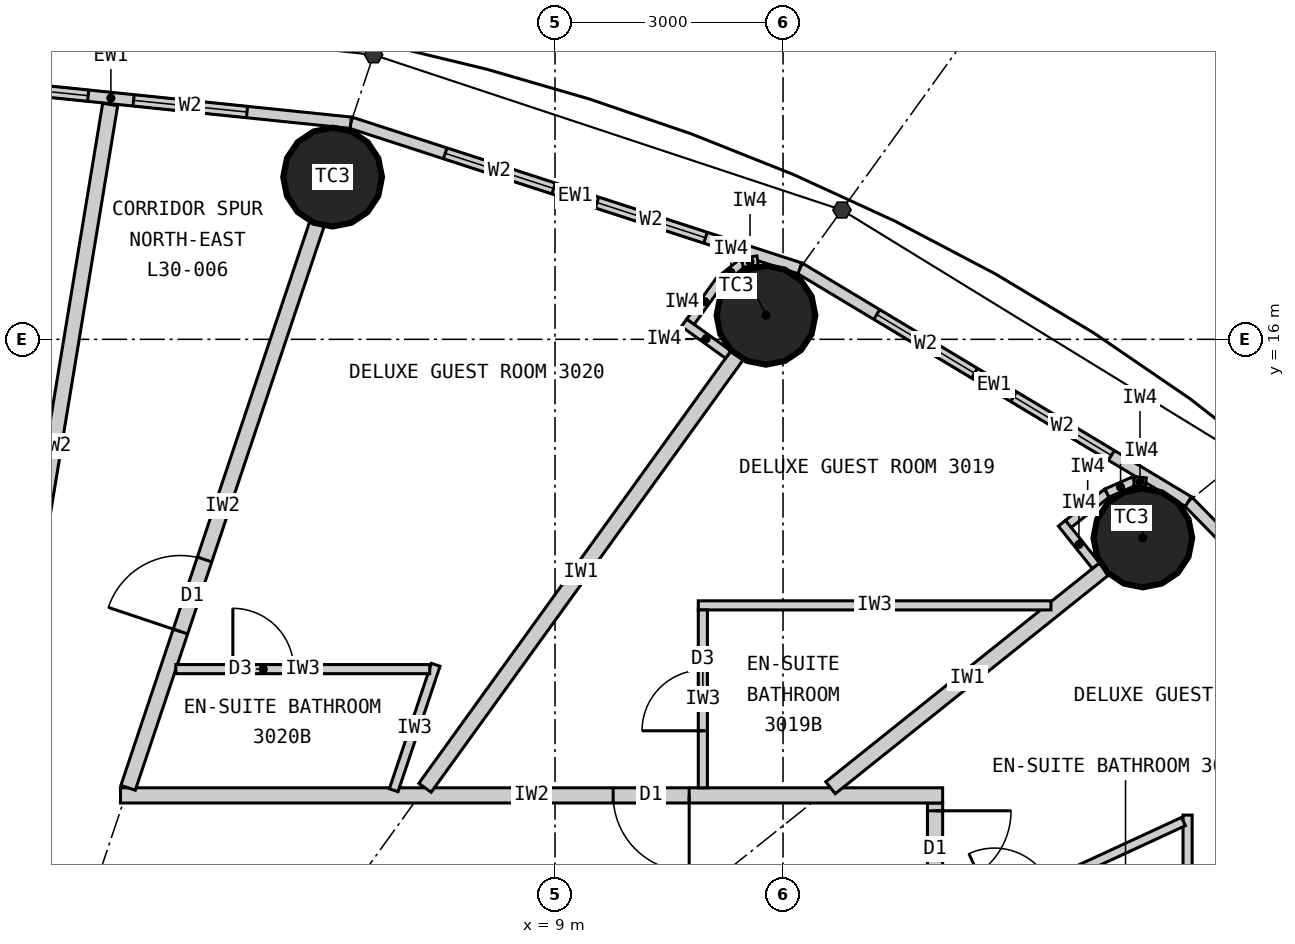
"""IFC4 building model, lengths in metres.
Left out: names, types, materials, properties, quantities, classifications, styles, units other than length and angle.
Written with IfcOpenShell. Run it as: python <this file> out.ifc"""

import sys

from ifc_helpers import new_model, si_unit, direction, frame, frame_2d, origin, origin_2d, place, context, subcontext, project, spatial, rectangle, circle, extrude, element, fill, save


model = new_model("IFC4")
c1 = context("Model", 3, precision=1e-05, world=origin(), true_north=direction((0.0, 1.0)))
c2 = subcontext(c1, "Body", "Model", "MODEL_VIEW")
j1 = project(units=[si_unit("LENGTHUNIT", "METRE"), si_unit("PLANEANGLEUNIT", "RADIAN")], contexts=[c1])
p1 = place(None, origin())
s1 = spatial("IfcSite", under=j1, at=p1, CompositionType="ELEMENT")
p2 = place(p1, origin())
s2 = spatial("IfcBuilding", under=s1, at=p2, CompositionType="ELEMENT")
p3 = place(p2, frame((0.0, 0.0, 118.8)))
s3 = spatial("IfcBuildingStorey", under=s2, at=p3, CompositionType="ELEMENT", Elevation=118.8)
for number, where, z_axis, x_axis in (
    (1, (16.734, 13.387, 0.0), (0.0, 0.0, 1.0), (1.0, 0.0, 0.0)),
    (2, (11.775, 16.316, 0.0), (0.0, 0.0, 1.0), (1.0, 0.0, 0.0)),
    (3, (6.074, 18.135, 0.0), (0.0, 0.0, 1.0), (1.0, 0.0, 0.0)),
):
    element("IfcColumn", number, at=place(p3, frame(where, z_axis=z_axis, x_axis=x_axis)), inside=s3, PredefinedType="COLUMN", context=c2, shape_type="SweptSolid", body=[
        extrude(circle(Radius=0.65, at=origin_2d()), origin(), (0.0, 0.0, 1.0), 3.3),
    ])
p4 = place(p3, frame((21.287, 9.832, 0.0), z_axis=(0.0, 0.0, 1.0), x_axis=(-0.700136650834, 0.714008872605, 0.0)))
e4 = element("IfcWall", 4, at=p4, inside=s3, PredefinedType="ELEMENTEDWALL", context=c2, shape_type="SweptSolid", body=[
    extrude(rectangle(XDim=5.649, YDim=0.15, at=frame_2d((2.825, 0.0))), origin(), (0.0, 0.0, 1.0), 3.12),
])
p5 = place(p4, frame((1.025, 0.0, 0.9)))
e5 = element("IfcOpeningElement", 5, at=p5, cuts=e4, PredefinedType="OPENING", context=c2, shape_type="SweptSolid", body=[
    extrude(rectangle(XDim=1.5, YDim=1.9, at=frame_2d((0.75, 0.95))), frame((0.0, 0.085, 0.0), z_axis=(0.0, -1.0, 0.0), x_axis=(1.0, 0.0, 0.0)), (0.0, 0.0, 1.0), 0.17),
])
p6 = place(p4, frame((3.125, 0.0, 0.9)))
e6 = element("IfcOpeningElement", 6, at=p6, cuts=e4, PredefinedType="OPENING", context=c2, shape_type="SweptSolid", body=[
    extrude(rectangle(XDim=1.5, YDim=1.9, at=frame_2d((0.75, 0.95))), frame((0.0, 0.085, 0.0), z_axis=(0.0, -1.0, 0.0), x_axis=(1.0, 0.0, 0.0)), (0.0, 0.0, 1.0), 0.17),
])
p7 = place(p3, frame((17.332, 13.866, 0.0), z_axis=(0.0, 0.0, 1.0), x_axis=(-0.857308573723, 0.514802884044, 0.0)))
e7 = element("IfcWall", 7, at=p7, inside=s3, PredefinedType="ELEMENTEDWALL", context=c2, shape_type="SweptSolid", body=[
    extrude(rectangle(XDim=5.961, YDim=0.15, at=frame_2d((2.98, 0.0))), origin(), (0.0, 0.0, 1.0), 3.12),
])
p8 = place(p7, frame((1.181, 0.0, 0.9)))
e8 = element("IfcOpeningElement", 8, at=p8, cuts=e7, PredefinedType="OPENING", context=c2, shape_type="SweptSolid", body=[
    extrude(rectangle(XDim=1.5, YDim=1.9, at=frame_2d((0.75, 0.95))), frame((0.0, 0.085, 0.0), z_axis=(0.0, -1.0, 0.0), x_axis=(1.0, 0.0, 0.0)), (0.0, 0.0, 1.0), 0.17),
])
p9 = place(p7, frame((3.281, 0.0, 0.9)))
e9 = element("IfcOpeningElement", 9, at=p9, cuts=e7, PredefinedType="OPENING", context=c2, shape_type="SweptSolid", body=[
    extrude(rectangle(XDim=1.5, YDim=1.9, at=frame_2d((0.75, 0.95))), frame((0.0, 0.085, 0.0), z_axis=(0.0, -1.0, 0.0), x_axis=(1.0, 0.0, 0.0)), (0.0, 0.0, 1.0), 0.17),
])
p10 = place(p3, frame((12.221, 16.935, 0.0), z_axis=(0.0, 0.0, 1.0), x_axis=(-0.951272691506, 0.308350881944, 0.0)))
e10 = element("IfcWall", 10, at=p10, inside=s3, PredefinedType="ELEMENTEDWALL", context=c2, shape_type="SweptSolid", body=[
    extrude(rectangle(XDim=6.211, YDim=0.15, at=frame_2d((3.105, 0.0))), origin(), (0.0, 0.0, 1.0), 3.12),
])
p11 = place(p10, frame((1.305, 0.0, 0.9)))
e11 = element("IfcOpeningElement", 11, at=p11, cuts=e10, PredefinedType="OPENING", context=c2, shape_type="SweptSolid", body=[
    extrude(rectangle(XDim=1.5, YDim=1.9, at=frame_2d((0.75, 0.95))), frame((0.0, 0.085, 0.0), z_axis=(0.0, -1.0, 0.0), x_axis=(1.0, 0.0, 0.0)), (0.0, 0.0, 1.0), 0.17),
])
p12 = place(p10, frame((3.405, 0.0, 0.9)))
e12 = element("IfcOpeningElement", 12, at=p12, cuts=e10, PredefinedType="OPENING", context=c2, shape_type="SweptSolid", body=[
    extrude(rectangle(XDim=1.5, YDim=1.9, at=frame_2d((0.75, 0.95))), frame((0.0, 0.085, 0.0), z_axis=(0.0, -1.0, 0.0), x_axis=(1.0, 0.0, 0.0)), (0.0, 0.0, 1.0), 0.17),
])
p13 = place(p3, frame((6.313, 18.85, 0.0), z_axis=(0.0, 0.0, 1.0), x_axis=(-0.994735690163, 0.102473931887, 0.0)))
e13 = element("IfcWall", 13, at=p13, inside=s3, PredefinedType="ELEMENTEDWALL", context=c2, shape_type="SweptSolid", body=[
    extrude(rectangle(XDim=6.347, YDim=0.15, at=frame_2d((3.173, 0.0))), origin(), (0.0, 0.0, 1.0), 3.12),
])
p14 = place(p13, frame((1.373, 0.0, 0.9)))
e14 = element("IfcOpeningElement", 14, at=p14, cuts=e13, PredefinedType="OPENING", context=c2, shape_type="SweptSolid", body=[
    extrude(rectangle(XDim=1.5, YDim=1.9, at=frame_2d((0.75, 0.95))), frame((0.0, 0.085, 0.0), z_axis=(0.0, -1.0, 0.0), x_axis=(1.0, 0.0, 0.0)), (0.0, 0.0, 1.0), 0.17),
])
p15 = place(p13, frame((3.473, 0.0, 0.9)))
e15 = element("IfcOpeningElement", 15, at=p15, cuts=e13, PredefinedType="OPENING", context=c2, shape_type="SweptSolid", body=[
    extrude(rectangle(XDim=1.5, YDim=1.9, at=frame_2d((0.75, 0.95))), frame((0.0, 0.085, 0.0), z_axis=(0.0, -1.0, 0.0), x_axis=(1.0, 0.0, 0.0)), (0.0, 0.0, 1.0), 0.17),
])
p16 = place(p3, frame((14.0, -9.9, 0.0), z_axis=(0.0, 0.0, 1.0), x_axis=(0.0, 1.0, 0.0)))
e16 = element("IfcWall", 16, at=p16, inside=s3, PredefinedType="PARTITIONING", context=c2, shape_type="SweptSolid", body=[
    extrude(rectangle(XDim=19.8, YDim=0.2, at=frame_2d((9.9, 0.0))), origin(), (0.0, 0.0, 1.0), 3.12),
])
p17 = place(p16, frame((2.478, 0.0, 0.0)))
e17 = element("IfcOpeningElement", 17, at=p17, cuts=e16, PredefinedType="OPENING", context=c2, shape_type="SweptSolid", body=[
    extrude(rectangle(XDim=1.0, YDim=2.2, at=frame_2d((0.5, 1.1))), frame((0.0, 0.11, 0.0), z_axis=(0.0, -1.0, 0.0), x_axis=(1.0, 0.0, 0.0)), (0.0, 0.0, 1.0), 0.22),
])
p18 = place(p16, frame((8.838, 0.0, 0.0)))
e18 = element("IfcOpeningElement", 18, at=p18, cuts=e16, PredefinedType="OPENING", context=c2, shape_type="SweptSolid", body=[
    extrude(rectangle(XDim=1.0, YDim=2.2, at=frame_2d((0.5, 1.1))), frame((0.0, 0.11, 0.0), z_axis=(0.0, -1.0, 0.0), x_axis=(1.0, 0.0, 0.0)), (0.0, 0.0, 1.0), 0.22),
])
p19 = place(p16, frame((13.742, 0.0, 0.0)))
e19 = element("IfcOpeningElement", 19, at=p19, cuts=e16, PredefinedType="OPENING", context=c2, shape_type="SweptSolid", body=[
    extrude(rectangle(XDim=1.0, YDim=2.2, at=frame_2d((0.5, 1.1))), frame((0.0, 0.11, 0.0), z_axis=(0.0, -1.0, 0.0), x_axis=(1.0, 0.0, 0.0)), (0.0, 0.0, 1.0), 0.22),
])
p20 = place(p16, frame((18.698, 0.0, 0.0)))
e20 = element("IfcOpeningElement", 20, at=p20, cuts=e16, PredefinedType="OPENING", context=c2, shape_type="SweptSolid", body=[
    extrude(rectangle(XDim=1.0, YDim=2.2, at=frame_2d((0.5, 1.1))), frame((0.0, 0.11, 0.0), z_axis=(0.0, -1.0, 0.0), x_axis=(1.0, 0.0, 0.0)), (0.0, 0.0, 1.0), 0.22),
])
p21 = place(p3, frame((3.283, 10.0, 0.0), z_axis=(0.0, 0.0, 1.0), x_axis=(1.0, 0.0, 0.0)))
e21 = element("IfcWall", 21, at=p21, inside=s3, PredefinedType="PARTITIONING", context=c2, shape_type="SweptSolid", body=[
    extrude(rectangle(XDim=10.817, YDim=0.2, at=frame_2d((5.409, 0.0))), origin(), (0.0, 0.0, 1.0), 3.12),
])
p22 = place(p21, frame((6.482, 0.0, 0.0)))
e22 = element("IfcOpeningElement", 22, at=p22, cuts=e21, PredefinedType="OPENING", context=c2, shape_type="SweptSolid", body=[
    extrude(rectangle(XDim=1.0, YDim=2.2, at=frame_2d((0.5, 1.1))), frame((0.0, 0.11, 0.0), z_axis=(0.0, -1.0, 0.0), x_axis=(1.0, 0.0, 0.0)), (0.0, 0.0, 1.0), 0.22),
])
p23 = place(p3, frame((14.1, 6.512, 0.0), z_axis=(0.0, 0.0, 1.0), x_axis=(0.907833019998, 0.419331858797, 0.0)))
e23 = element("IfcWall", 23, at=p23, inside=s3, PredefinedType="PARTITIONING", context=c2, shape_type="SweptSolid", body=[
    extrude(rectangle(XDim=6.505, YDim=0.2, at=frame_2d((3.252, 0.0))), origin(), (0.0, 0.0, 1.0), 2.27),
])
p24 = place(p3, frame((12.625, 10.1, 0.0), z_axis=(0.0, 0.0, 1.0), x_axis=(0.780863644897, 0.624701503182, 0.0)))
e24 = element("IfcWall", 24, at=p24, inside=s3, PredefinedType="PARTITIONING", context=c2, shape_type="SweptSolid", body=[
    extrude(rectangle(XDim=4.612, YDim=0.2, at=frame_2d((2.306, 0.0))), origin(), (0.0, 0.0, 1.0), 2.37),
])
p25 = place(p3, frame((7.289, 10.1, 0.0), z_axis=(0.0, 0.0, 1.0), x_axis=(0.585217367024, 0.81087645997, 0.0)))
e25 = element("IfcWall", 25, at=p25, inside=s3, PredefinedType="PARTITIONING", context=c2, shape_type="SweptSolid", body=[
    extrude(rectangle(XDim=7.016, YDim=0.2, at=frame_2d((3.508, 0.0))), origin(), (0.0, 0.0, 1.0), 2.37),
])
p26 = place(p3, frame((3.383, 10.1, 0.0), z_axis=(0.0, 0.0, 1.0), x_axis=(0.317603705574, 0.948223542318, 0.0)))
e26 = element("IfcWall", 26, at=p26, inside=s3, PredefinedType="PARTITIONING", context=c2, shape_type="SweptSolid", body=[
    extrude(rectangle(XDim=7.823, YDim=0.2, at=frame_2d((3.912, 0.0))), origin(), (0.0, 0.0, 1.0), 2.37),
])
p27 = place(p26, frame((2.168, 0.0, 0.0)))
e27 = element("IfcOpeningElement", 27, at=p27, cuts=e26, PredefinedType="OPENING", context=c2, shape_type="SweptSolid", body=[
    extrude(rectangle(XDim=1.0, YDim=2.2, at=frame_2d((0.5, 1.1))), frame((0.0, 0.11, 0.0), z_axis=(0.0, -1.0, 0.0), x_axis=(1.0, 0.0, 0.0)), (0.0, 0.0, 1.0), 0.22),
])
p28 = place(p3, frame((1.665, 10.1, 0.0), z_axis=(0.0, 0.0, 1.0), x_axis=(0.162660519103, 0.986682094459, 0.0)))
e28 = element("IfcWall", 28, at=p28, inside=s3, PredefinedType="PARTITIONING", context=c2, shape_type="SweptSolid", body=[
    extrude(rectangle(XDim=9.111, YDim=0.2, at=frame_2d((4.555, 0.0))), origin(), (0.0, 0.0, 1.0), 3.12),
])
p29 = place(p28, frame((1.86, 0.0, 0.0)))
e29 = element("IfcOpeningElement", 29, at=p29, cuts=e28, PredefinedType="OPENING", context=c2, shape_type="SweptSolid", body=[
    extrude(rectangle(XDim=1.0, YDim=2.2, at=frame_2d((0.5, 1.1))), frame((0.0, 0.11, 0.0), z_axis=(0.0, -1.0, 0.0), x_axis=(1.0, 0.0, 0.0)), (0.0, 0.0, 1.0), 0.22),
])
p30 = place(p3, frame((17.323, 8.101, 0.0), z_axis=(0.0, 0.0, 1.0), x_axis=(0.0, 1.0, 0.0)))
e30 = element("IfcWall", 30, at=p30, inside=s3, PredefinedType="PARTITIONING", context=c2, shape_type="SweptSolid", body=[
    extrude(rectangle(XDim=1.64, YDim=0.12, at=frame_2d((0.82, 0.0))), origin(), (0.0, 0.0, 1.0), 3.12),
])
p31 = place(p3, frame((14.1, 8.193, 0.0), z_axis=(0.0, 0.0, 1.0), x_axis=(0.907836493557, 0.419324338628, 0.0)))
e31 = element("IfcWall", 31, at=p31, inside=s3, PredefinedType="PARTITIONING", context=c2, shape_type="SweptSolid", body=[
    extrude(rectangle(XDim=3.49, YDim=0.12, at=frame_2d((1.745, 0.0))), origin(), (0.0, 0.0, 1.0), 3.12),
])
p32 = place(p31, frame((0.75, 0.0, 0.0)))
e32 = element("IfcOpeningElement", 32, at=p32, cuts=e31, PredefinedType="OPENING", context=c2, shape_type="SweptSolid", body=[
    extrude(rectangle(XDim=0.8, YDim=2.1, at=frame_2d((0.4, 1.05))), frame((0.0, 0.07, 0.0), z_axis=(0.0, -1.0, 0.0), x_axis=(1.0, 0.0, 0.0)), (0.0, 0.0, 1.0), 0.14),
])
p33 = place(p3, frame((15.525, 12.5, 0.0), z_axis=(0.0, 0.0, 1.0), x_axis=(-1.0, 0.0, 0.0)))
e33 = element("IfcWall", 33, at=p33, inside=s3, PredefinedType="PARTITIONING", context=c2, shape_type="SweptSolid", body=[
    extrude(rectangle(XDim=4.64, YDim=0.12, at=frame_2d((2.32, 0.0))), origin(), (0.0, 0.0, 1.0), 3.12),
])
p34 = place(p3, frame((10.945, 10.1, 0.0), z_axis=(0.0, 0.0, 1.0), x_axis=(0.0, 1.0, 0.0)))
e34 = element("IfcWall", 34, at=p34, inside=s3, PredefinedType="PARTITIONING", context=c2, shape_type="SweptSolid", body=[
    extrude(rectangle(XDim=2.34, YDim=0.12, at=frame_2d((1.17, 0.0))), origin(), (0.0, 0.0, 1.0), 3.12),
])
p35 = place(p34, frame((0.75, 0.0, 0.0)))
e35 = element("IfcOpeningElement", 35, at=p35, cuts=e34, PredefinedType="OPENING", context=c2, shape_type="SweptSolid", body=[
    extrude(rectangle(XDim=0.8, YDim=2.1, at=frame_2d((0.4, 1.05))), frame((0.0, 0.07, 0.0), z_axis=(0.0, -1.0, 0.0), x_axis=(1.0, 0.0, 0.0)), (0.0, 0.0, 1.0), 0.14),
])
p36 = place(p3, frame((6.878, 10.068, 0.0), z_axis=(0.0, 0.0, 1.0), x_axis=(0.317532394508, 0.948247424694, 0.0)))
e36 = element("IfcWall", 36, at=p36, inside=s3, PredefinedType="PARTITIONING", context=c2, shape_type="SweptSolid", body=[
    extrude(rectangle(XDim=1.74, YDim=0.12, at=frame_2d((0.87, 0.0))), origin(), (0.0, 0.0, 1.0), 3.12),
])
p37 = place(p3, frame((4.011, 11.661, 0.0), z_axis=(0.0, 0.0, 1.0), x_axis=(1.0, 0.0, 0.0)))
e37 = element("IfcWall", 37, at=p37, inside=s3, PredefinedType="PARTITIONING", context=c2, shape_type="SweptSolid", body=[
    extrude(rectangle(XDim=3.34, YDim=0.12, at=frame_2d((1.67, 0.0))), origin(), (0.0, 0.0, 1.0), 3.12),
])
p38 = place(p37, frame((0.75, 0.0, 0.0)))
e38 = element("IfcOpeningElement", 38, at=p38, cuts=e37, PredefinedType="OPENING", context=c2, shape_type="SweptSolid", body=[
    extrude(rectangle(XDim=0.8, YDim=2.1, at=frame_2d((0.4, 1.05))), frame((0.0, 0.07, 0.0), z_axis=(0.0, -1.0, 0.0), x_axis=(1.0, 0.0, 0.0)), (0.0, 0.0, 1.0), 0.14),
])
p39 = place(p3, frame((16.117, 13.022, 0.0), z_axis=(0.0, 0.0, 1.0), x_axis=(-0.62465344249, 0.780902091677, 0.0)))
e39 = element("IfcWall", 39, at=p39, inside=s3, PredefinedType="PARTITIONING", context=c2, shape_type="SweptSolid", body=[
    extrude(rectangle(XDim=0.716, YDim=0.12, at=frame_2d((0.358, 0.0))), origin(), (0.0, 0.0, 1.0), 3.12),
])
p40 = place(p3, frame((15.754, 13.571, 0.0), z_axis=(0.0, 0.0, 1.0), x_axis=(0.780905453553, 0.624649239663, 0.0)))
e40 = element("IfcWall", 40, at=p40, inside=s3, PredefinedType="PARTITIONING", context=c2, shape_type="SweptSolid", body=[
    extrude(rectangle(XDim=0.65, YDim=0.12, at=frame_2d((0.325, 0.0))), origin(), (0.0, 0.0, 1.0), 3.12),
])
p41 = place(p3, frame((16.262, 13.977, 0.0), z_axis=(0.0, 0.0, 1.0), x_axis=(0.915985403703, 0.401211590314, 0.0)))
e41 = element("IfcWall", 41, at=p41, inside=s3, PredefinedType="PARTITIONING", context=c2, shape_type="SweptSolid", body=[
    extrude(rectangle(XDim=0.391, YDim=0.12, at=frame_2d((0.196, 0.0))), origin(), (0.0, 0.0, 1.0), 3.12),
])
p42 = place(p3, frame((16.62, 14.134, 0.0), z_axis=(0.0, 0.0, 1.0), x_axis=(0.993941871493, -0.109907033867, 0.0)))
e42 = element("IfcWall", 42, at=p42, inside=s3, PredefinedType="PARTITIONING", context=c2, shape_type="SweptSolid", body=[
    extrude(rectangle(XDim=0.153, YDim=0.12, at=frame_2d((0.077, 0.0))), origin(), (0.0, 0.0, 1.0), 3.12),
])
p43 = place(p3, frame((11.279, 15.799, 0.0), z_axis=(0.0, 0.0, 1.0), x_axis=(-0.810912957127, 0.585166793285, 0.0)))
e43 = element("IfcWall", 43, at=p43, inside=s3, PredefinedType="PARTITIONING", context=c2, shape_type="SweptSolid", body=[
    extrude(rectangle(XDim=0.716, YDim=0.12, at=frame_2d((0.358, 0.0))), origin(), (0.0, 0.0, 1.0), 3.12),
])
p44 = place(p3, frame((10.782, 16.231, 0.0), z_axis=(0.0, 0.0, 1.0), x_axis=(0.585175102182, 0.810906961239, 0.0)))
e44 = element("IfcWall", 44, at=p44, inside=s3, PredefinedType="PARTITIONING", context=c2, shape_type="SweptSolid", body=[
    extrude(rectangle(XDim=0.65, YDim=0.12, at=frame_2d((0.325, 0.0))), origin(), (0.0, 0.0, 1.0), 3.12),
])
p45 = place(p3, frame((11.162, 16.759, 0.0), z_axis=(0.0, 0.0, 1.0), x_axis=(0.775178428527, 0.63174235567, 0.0)))
e45 = element("IfcWall", 45, at=p45, inside=s3, PredefinedType="PARTITIONING", context=c2, shape_type="SweptSolid", body=[
    extrude(rectangle(XDim=0.392, YDim=0.12, at=frame_2d((0.196, 0.0))), origin(), (0.0, 0.0, 1.0), 3.12),
])
p46 = place(p3, frame((11.466, 17.006, 0.0), z_axis=(0.0, 0.0, 1.0), x_axis=(0.987228877621, 0.15930832744, 0.0)))
e46 = element("IfcWall", 46, at=p46, inside=s3, PredefinedType="PARTITIONING", context=c2, shape_type="SweptSolid", body=[
    extrude(rectangle(XDim=0.202, YDim=0.12, at=frame_2d((0.101, 0.0))), origin(), (0.0, 0.0, 1.0), 3.12),
])
p47 = place(p8, origin())
e47 = element("IfcWindow", 47, at=p47, inside=s3, PartitioningType="SINGLE_PANEL", PredefinedType="WINDOW", context=c2, shape_type="SweptSolid", body=[
    extrude(rectangle(XDim=1.5, YDim=1.9, at=frame_2d((0.75, 0.95))), frame((0.0, 0.03, 0.0), z_axis=(0.0, -1.0, 0.0), x_axis=(1.0, 0.0, 0.0)), (0.0, 0.0, 1.0), 0.06),
])
fill(e8, e47)
p48 = place(p9, origin())
e48 = element("IfcWindow", 48, at=p48, inside=s3, PartitioningType="SINGLE_PANEL", PredefinedType="WINDOW", context=c2, shape_type="SweptSolid", body=[
    extrude(rectangle(XDim=1.5, YDim=1.9, at=frame_2d((0.75, 0.95))), frame((0.0, 0.03, 0.0), z_axis=(0.0, -1.0, 0.0), x_axis=(1.0, 0.0, 0.0)), (0.0, 0.0, 1.0), 0.06),
])
fill(e9, e48)
p49 = place(p11, origin())
e49 = element("IfcWindow", 49, at=p49, inside=s3, PartitioningType="SINGLE_PANEL", PredefinedType="WINDOW", context=c2, shape_type="SweptSolid", body=[
    extrude(rectangle(XDim=1.5, YDim=1.9, at=frame_2d((0.75, 0.95))), frame((0.0, 0.03, 0.0), z_axis=(0.0, -1.0, 0.0), x_axis=(1.0, 0.0, 0.0)), (0.0, 0.0, 1.0), 0.06),
])
fill(e11, e49)
p50 = place(p12, origin())
e50 = element("IfcWindow", 50, at=p50, inside=s3, PartitioningType="SINGLE_PANEL", PredefinedType="WINDOW", context=c2, shape_type="SweptSolid", body=[
    extrude(rectangle(XDim=1.5, YDim=1.9, at=frame_2d((0.75, 0.95))), frame((0.0, 0.03, 0.0), z_axis=(0.0, -1.0, 0.0), x_axis=(1.0, 0.0, 0.0)), (0.0, 0.0, 1.0), 0.06),
])
fill(e12, e50)
p51 = place(p14, origin())
e51 = element("IfcWindow", 51, at=p51, inside=s3, PartitioningType="SINGLE_PANEL", PredefinedType="WINDOW", context=c2, shape_type="SweptSolid", body=[
    extrude(rectangle(XDim=1.5, YDim=1.9, at=frame_2d((0.75, 0.95))), frame((0.0, 0.03, 0.0), z_axis=(0.0, -1.0, 0.0), x_axis=(1.0, 0.0, 0.0)), (0.0, 0.0, 1.0), 0.06),
])
fill(e14, e51)
p52 = place(p15, origin())
e52 = element("IfcWindow", 52, at=p52, inside=s3, PartitioningType="SINGLE_PANEL", PredefinedType="WINDOW", context=c2, shape_type="SweptSolid", body=[
    extrude(rectangle(XDim=1.5, YDim=1.9, at=frame_2d((0.75, 0.95))), frame((0.0, 0.03, 0.0), z_axis=(0.0, -1.0, 0.0), x_axis=(1.0, 0.0, 0.0)), (0.0, 0.0, 1.0), 0.06),
])
fill(e15, e52)
p53 = place(p20, origin())
e53 = element("IfcDoor", 53, at=p53, inside=s3, OperationType="SINGLE_SWING_RIGHT", PredefinedType="DOOR", context=c2, shape_type="SweptSolid", body=[
    extrude(rectangle(XDim=1.0, YDim=2.2, at=frame_2d((0.5, 1.1))), frame((0.0, 0.025, 0.0), z_axis=(0.0, -1.0, 0.0), x_axis=(1.0, 0.0, 0.0)), (0.0, 0.0, 1.0), 0.05),
])
fill(e20, e53)
p54 = place(p35, origin())
e54 = element("IfcDoor", 54, at=p54, inside=s3, OperationType="SINGLE_SWING_LEFT", PredefinedType="DOOR", context=c2, shape_type="SweptSolid", body=[
    extrude(rectangle(XDim=0.8, YDim=2.1, at=frame_2d((0.4, 1.05))), frame((0.0, 0.025, 0.0), z_axis=(0.0, -1.0, 0.0), x_axis=(1.0, 0.0, 0.0)), (0.0, 0.0, 1.0), 0.05),
])
fill(e35, e54)
p55 = place(p22, origin())
e55 = element("IfcDoor", 55, at=p55, inside=s3, OperationType="SINGLE_SWING_RIGHT", PredefinedType="DOOR", context=c2, shape_type="SweptSolid", body=[
    extrude(rectangle(XDim=1.0, YDim=2.2, at=frame_2d((0.5, 1.1))), frame((0.0, 0.025, 0.0), z_axis=(0.0, -1.0, 0.0), x_axis=(1.0, 0.0, 0.0)), (0.0, 0.0, 1.0), 0.05),
])
fill(e22, e55)
p56 = place(p38, origin())
e56 = element("IfcDoor", 56, at=p56, inside=s3, OperationType="SINGLE_SWING_LEFT", PredefinedType="DOOR", context=c2, shape_type="SweptSolid", body=[
    extrude(rectangle(XDim=0.8, YDim=2.1, at=frame_2d((0.4, 1.05))), frame((0.0, 0.025, 0.0), z_axis=(0.0, -1.0, 0.0), x_axis=(1.0, 0.0, 0.0)), (0.0, 0.0, 1.0), 0.05),
])
fill(e38, e56)
p57 = place(p27, origin())
e57 = element("IfcDoor", 57, at=p57, inside=s3, OperationType="SINGLE_SWING_LEFT", PredefinedType="DOOR", context=c2, shape_type="SweptSolid", body=[
    extrude(rectangle(XDim=1.0, YDim=2.2, at=frame_2d((0.5, 1.1))), frame((0.0, 0.025, 0.0), z_axis=(0.0, -1.0, 0.0), x_axis=(1.0, 0.0, 0.0)), (0.0, 0.0, 1.0), 0.05),
])
fill(e27, e57)
save(model, sys.argv[1])
